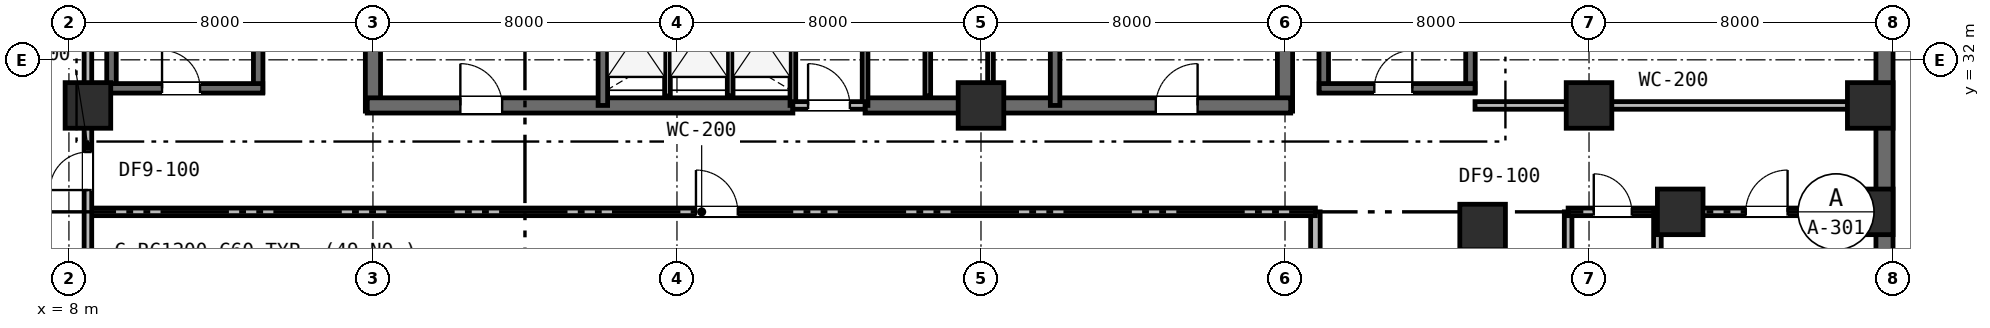
"""IFC4 building model, lengths in metres.
Left out: names, types, materials, properties, quantities, classifications, styles, units other than length and angle.
Written with IfcOpenShell. Run it as: python <this file> out.ifc"""

import sys

from ifc_helpers import new_model, si_unit, direction, frame, frame_2d, origin, origin_2d, place, context, subcontext, project, spatial, rectangle, extrude, element, fill, save


model = new_model("IFC4")
c1 = context("Model", 3, precision=1e-05, world=origin(), true_north=direction((0.0, 1.0)))
c2 = subcontext(c1, "Body", "Model", "MODEL_VIEW")
j1 = project(units=[si_unit("LENGTHUNIT", "METRE"), si_unit("PLANEANGLEUNIT", "RADIAN")], contexts=[c1])
p1 = place(None, origin())
s1 = spatial("IfcSite", under=j1, at=p1, CompositionType="ELEMENT")
p2 = place(p1, origin())
s2 = spatial("IfcBuilding", under=s1, at=p2, CompositionType="ELEMENT")
p3 = place(p2, frame((0.0, 0.0, -5.6)))
s3 = spatial("IfcBuildingStorey", under=s2, at=p3, CompositionType="ELEMENT", Elevation=-5.6)
p4 = place(p3, frame((55.775, 0.0, 0.0), z_axis=(0.0, 0.0, 1.0), x_axis=(0.0, 1.0, 0.0)))
e1 = element("IfcWall", 1, at=p4, inside=s3, PredefinedType="USERDEFINED", context=c2, shape_type="SweptSolid", body=[
    extrude(rectangle(XDim=48.0, YDim=0.45, at=frame_2d((24.0, 0.0))), origin(), (0.0, 0.0, 1.0), 5.6),
])
for number, where, z_axis, x_axis in (
    (2, (16.0, 30.65, 0.0), (0.0, 0.0, 1.0), (0.0, 1.0, 0.0)),
    (3, (40.0, 30.65, 0.0), (0.0, 0.0, 1.0), (0.0, 1.0, 0.0)),
):
    element("IfcWall", number, at=place(p3, frame(where, z_axis=z_axis, x_axis=x_axis)), inside=s3, PredefinedType="SHEAR", context=c2, shape_type="SweptSolid", body=[
        extrude(rectangle(XDim=12.3, YDim=0.4, at=frame_2d((6.15, 0.0))), origin(), (0.0, 0.0, 1.0), 5.6),
    ])
p5 = place(p3, frame((15.85, 30.8, 0.0), z_axis=(0.0, 0.0, 1.0), x_axis=(1.0, 0.0, 0.0)))
e4 = element("IfcWall", 4, at=p5, inside=s3, PredefinedType="SHEAR", context=c2, shape_type="SweptSolid", body=[
    extrude(rectangle(XDim=11.2, YDim=0.4, at=frame_2d((5.6, 0.0))), origin(), (0.0, 0.0, 1.0), 5.6),
])
p6 = place(p5, frame((2.45, 0.0, 0.0)))
e5 = element("IfcOpeningElement", 5, at=p6, cuts=e4, PredefinedType="OPENING", context=c2, shape_type="SweptSolid", body=[
    extrude(rectangle(XDim=1.1, YDim=2.15, at=frame_2d((0.55, 1.075))), frame((0.0, 0.21, 0.0), z_axis=(0.0, -1.0, 0.0), x_axis=(1.0, 0.0, 0.0)), (0.0, 0.0, 1.0), 0.42),
])
p7 = place(p3, frame((28.95, 30.8, 0.0), z_axis=(0.0, 0.0, 1.0), x_axis=(1.0, 0.0, 0.0)))
e6 = element("IfcWall", 6, at=p7, inside=s3, PredefinedType="SHEAR", context=c2, shape_type="SweptSolid", body=[
    extrude(rectangle(XDim=11.2, YDim=0.4, at=frame_2d((5.6, 0.0))), origin(), (0.0, 0.0, 1.0), 5.6),
])
p8 = place(p7, frame((7.65, 0.0, 0.0)))
e7 = element("IfcOpeningElement", 7, at=p8, cuts=e6, PredefinedType="OPENING", context=c2, shape_type="SweptSolid", body=[
    extrude(rectangle(XDim=1.1, YDim=2.15, at=frame_2d((0.55, 1.075))), frame((0.0, 0.21, 0.0), z_axis=(0.0, -1.0, 0.0), x_axis=(1.0, 0.0, 0.0)), (0.0, 0.0, 1.0), 0.42),
])
for number, where, z_axis, x_axis in (
    (8, (22.05, 30.8, 0.0), (0.0, 0.0, 1.0), (0.0, 1.0, 0.0)),
    (9, (33.95, 30.8, 0.0), (0.0, 0.0, 1.0), (0.0, 1.0, 0.0)),
):
    element("IfcWall", number, at=place(p3, frame(where, z_axis=z_axis, x_axis=x_axis)), inside=s3, PredefinedType="SHEAR", context=c2, shape_type="SweptSolid", body=[
        extrude(rectangle(XDim=6.45, YDim=0.25, at=frame_2d((3.225, 0.0))), origin(), (0.0, 0.0, 1.0), 5.6),
    ])
for number, where, z_axis, x_axis in (
    (10, (9.12, 31.15, 0.0), (0.0, 0.0, 1.0), (0.0, 1.0, 0.0)),
    (11, (12.98, 31.15, 0.0), (0.0, 0.0, 1.0), (0.0, 1.0, 0.0)),
):
    element("IfcWall", number, at=place(p3, frame(where, z_axis=z_axis, x_axis=x_axis)), inside=s3, PredefinedType="SHEAR", context=c2, shape_type="SweptSolid", body=[
        extrude(rectangle(XDim=8.8, YDim=0.25, at=frame_2d((4.4, 0.0))), origin(), (0.0, 0.0, 1.0), 5.6),
    ])
p9 = place(p3, frame((9.0, 31.25, 0.0), z_axis=(0.0, 0.0, 1.0), x_axis=(1.0, 0.0, 0.0)))
e12 = element("IfcWall", 12, at=p9, inside=s3, PredefinedType="SHEAR", context=c2, shape_type="SweptSolid", body=[
    extrude(rectangle(XDim=4.1, YDim=0.25, at=frame_2d((2.05, 0.0))), origin(), (0.0, 0.0, 1.0), 5.6),
])
p10 = place(p9, frame((1.45, 0.0, 0.0)))
e13 = element("IfcOpeningElement", 13, at=p10, cuts=e12, PredefinedType="OPENING", context=c2, shape_type="SweptSolid", body=[
    extrude(rectangle(XDim=1.0, YDim=2.15, at=frame_2d((0.5, 1.075))), frame((0.0, 0.135, 0.0), z_axis=(0.0, -1.0, 0.0), x_axis=(1.0, 0.0, 0.0)), (0.0, 0.0, 1.0), 0.27),
])
for number, where, z_axis, x_axis in (
    (14, (41.02, 31.15, 0.0), (0.0, 0.0, 1.0), (0.0, 1.0, 0.0)),
    (15, (44.88, 31.15, 0.0), (0.0, 0.0, 1.0), (0.0, 1.0, 0.0)),
):
    element("IfcWall", number, at=place(p3, frame(where, z_axis=z_axis, x_axis=x_axis)), inside=s3, PredefinedType="SHEAR", context=c2, shape_type="SweptSolid", body=[
        extrude(rectangle(XDim=8.8, YDim=0.25, at=frame_2d((4.4, 0.0))), origin(), (0.0, 0.0, 1.0), 5.6),
    ])
p11 = place(p3, frame((40.9, 31.25, 0.0), z_axis=(0.0, 0.0, 1.0), x_axis=(1.0, 0.0, 0.0)))
e16 = element("IfcWall", 16, at=p11, inside=s3, PredefinedType="SHEAR", context=c2, shape_type="SweptSolid", body=[
    extrude(rectangle(XDim=4.1, YDim=0.25, at=frame_2d((2.05, 0.0))), origin(), (0.0, 0.0, 1.0), 5.6),
])
p12 = place(p11, frame((1.45, 0.0, 0.0)))
e17 = element("IfcOpeningElement", 17, at=p12, cuts=e16, PredefinedType="OPENING", context=c2, shape_type="SweptSolid", body=[
    extrude(rectangle(XDim=1.0, YDim=2.15, at=frame_2d((0.5, 1.075))), frame((0.0, 0.135, 0.0), z_axis=(0.0, -1.0, 0.0), x_axis=(1.0, 0.0, 0.0)), (0.0, 0.0, 1.0), 0.27),
])
for number, where, z_axis, x_axis in (
    (18, (8.5, 30.8, 0.0), (0.0, 0.0, 1.0), (1.0, 0.0, 0.0)),
    (19, (45.2, 27.6, 0.0), (0.0, 0.0, 1.0), (1.0, 0.0, 0.0)),
    (20, (50.4, 28.0, 0.0), (0.0, 0.0, 1.0), (1.0, 0.0, 0.0)),
    (21, (55.4, 28.0, 0.0), (0.0, 0.0, 1.0), (1.0, 0.0, 0.0)),
    (22, (55.4, 30.8, 0.0), (0.0, 0.0, 1.0), (1.0, 0.0, 0.0)),
    (23, (32.0, 30.8, 0.0), (0.0, 0.0, 1.0), (1.0, 0.0, 0.0)),
    (24, (48.0, 30.8, 0.0), (0.0, 0.0, 1.0), (1.0, 0.0, 0.0)),
):
    element("IfcColumn", number, at=place(p3, frame(where, z_axis=z_axis, x_axis=x_axis)), inside=s3, PredefinedType="COLUMN", context=c2, shape_type="SweptSolid", body=[
        extrude(rectangle(XDim=1.2, YDim=1.2, at=origin_2d()), origin(), (0.0, 0.0, 1.0), 5.6),
    ])
p13 = place(p3, frame((40.8, 12.0, 0.0), z_axis=(0.0, 0.0, 1.0), x_axis=(0.0, 1.0, 0.0)))
e25 = element("IfcWall", 25, at=p13, inside=s3, PredefinedType="STANDARD", context=c2, shape_type="SweptSolid", body=[
    extrude(rectangle(XDim=16.0, YDim=0.25, at=frame_2d((8.0, 0.0))), origin(), (0.0, 0.0, 1.0), 5.27),
])
p14 = place(p3, frame((27.05, 30.8, 0.0), z_axis=(0.0, 0.0, 1.0), x_axis=(0.0, 1.0, 0.0)))
e26 = element("IfcWall", 26, at=p14, inside=s3, PredefinedType="PLUMBINGWALL", context=c2, shape_type="SweptSolid", body=[
    extrude(rectangle(XDim=3.45, YDim=0.15, at=frame_2d((1.725, 0.0))), origin(), (0.0, 0.0, 1.0), 5.01),
])
p15 = place(p3, frame((28.95, 30.8, 0.0), z_axis=(0.0, 0.0, 1.0), x_axis=(0.0, 1.0, 0.0)))
e27 = element("IfcWall", 27, at=p15, inside=s3, PredefinedType="PLUMBINGWALL", context=c2, shape_type="SweptSolid", body=[
    extrude(rectangle(XDim=3.45, YDim=0.15, at=frame_2d((1.725, 0.0))), origin(), (0.0, 0.0, 1.0), 4.76),
])
p16 = place(p3, frame((27.05, 30.8, 0.0), z_axis=(0.0, 0.0, 1.0), x_axis=(1.0, 0.0, 0.0)))
e28 = element("IfcWall", 28, at=p16, inside=s3, PredefinedType="PARTITIONING", context=c2, shape_type="SweptSolid", body=[
    extrude(rectangle(XDim=1.9, YDim=0.2, at=frame_2d((0.95, 0.0))), origin(), (0.0, 0.0, 1.0), 4.76),
])
p17 = place(p16, frame((0.4, 0.0, 0.0)))
e29 = element("IfcOpeningElement", 29, at=p17, cuts=e28, PredefinedType="OPENING", context=c2, shape_type="SweptSolid", body=[
    extrude(rectangle(XDim=1.1, YDim=2.15, at=frame_2d((0.55, 1.075))), frame((0.0, 0.11, 0.0), z_axis=(0.0, -1.0, 0.0), x_axis=(1.0, 0.0, 0.0)), (0.0, 0.0, 1.0), 0.22),
])
for number, where, z_axis, x_axis in (
    (30, (23.75, 31.05, 0.0), (0.0, 0.0, 1.0), (0.0, 1.0, 0.0)),
    (31, (25.4, 31.05, 0.0), (0.0, 0.0, 1.0), (0.0, 1.0, 0.0)),
    (32, (30.6, 31.05, 0.0), (0.0, 0.0, 1.0), (0.0, 1.0, 0.0)),
):
    element("IfcWall", number, at=place(p3, frame(where, z_axis=z_axis, x_axis=x_axis)), inside=s3, PredefinedType="PLUMBINGWALL", context=c2, shape_type="SweptSolid", body=[
        extrude(rectangle(XDim=3.1, YDim=0.15, at=frame_2d((1.55, 0.0))), origin(), (0.0, 0.0, 1.0), 5.27),
    ])
p18 = place(p3, frame((32.25, 31.05, 0.0), z_axis=(0.0, 0.0, 1.0), x_axis=(0.0, 1.0, 0.0)))
e33 = element("IfcWall", 33, at=p18, inside=s3, PredefinedType="PLUMBINGWALL", context=c2, shape_type="SweptSolid", body=[
    extrude(rectangle(XDim=3.1, YDim=0.15, at=frame_2d((1.55, 0.0))), origin(), (0.0, 0.0, 1.0), 4.66),
])
p19 = place(p3, frame((45.0, 30.8, 0.0), z_axis=(0.0, 0.0, 1.0), x_axis=(1.0, 0.0, 0.0)))
e34 = element("IfcWall", 34, at=p19, inside=s3, PredefinedType="PARTITIONING", context=c2, shape_type="SweptSolid", body=[
    extrude(rectangle(XDim=10.45, YDim=0.2, at=frame_2d((5.225, 0.0))), origin(), (0.0, 0.0, 1.0), 4.66),
])
p20 = place(p3, frame((8.5, 28.0, 0.0), z_axis=(0.0, 0.0, 1.0), x_axis=(1.0, 0.0, 0.0)))
e35 = element("IfcWall", 35, at=p20, inside=s3, PredefinedType="PARTITIONING", context=c2, shape_type="SweptSolid", body=[
    extrude(rectangle(XDim=32.3, YDim=0.2, at=frame_2d((16.15, 0.0))), origin(), (0.0, 0.0, 1.0), 4.66),
])
p21 = place(p20, frame((16.0, 0.0, 0.0)))
e36 = element("IfcOpeningElement", 36, at=p21, cuts=e35, PredefinedType="OPENING", context=c2, shape_type="SweptSolid", body=[
    extrude(rectangle(XDim=1.1, YDim=2.15, at=frame_2d((0.55, 1.075))), frame((0.0, 0.11, 0.0), z_axis=(0.0, -1.0, 0.0), x_axis=(1.0, 0.0, 0.0)), (0.0, 0.0, 1.0), 0.22),
])
p22 = place(p3, frame((8.5, 12.0, 0.0), z_axis=(0.0, 0.0, 1.0), x_axis=(0.0, 1.0, 0.0)))
e37 = element("IfcWall", 37, at=p22, inside=s3, PredefinedType="PARTITIONING", context=c2, shape_type="SweptSolid", body=[
    extrude(rectangle(XDim=35.45, YDim=0.2, at=frame_2d((17.725, 0.0))), origin(), (0.0, 0.0, 1.0), 4.66),
])
p23 = place(p22, frame((16.574, 0.0, 0.0)))
e38 = element("IfcOpeningElement", 38, at=p23, cuts=e37, PredefinedType="OPENING", context=c2, shape_type="SweptSolid", body=[
    extrude(rectangle(XDim=1.0, YDim=2.15, at=frame_2d((0.5, 1.075))), frame((0.0, 0.11, 0.0), z_axis=(0.0, -1.0, 0.0), x_axis=(1.0, 0.0, 0.0)), (0.0, 0.0, 1.0), 0.22),
])
p24 = place(p3, frame((47.45, 23.85, 0.0), z_axis=(0.0, 0.0, 1.0), x_axis=(0.0, 1.0, 0.0)))
e39 = element("IfcWall", 39, at=p24, inside=s3, PredefinedType="PARTITIONING", context=c2, shape_type="SweptSolid", body=[
    extrude(rectangle(XDim=4.15, YDim=0.2, at=frame_2d((2.075, 0.0))), origin(), (0.0, 0.0, 1.0), 5.27),
])
p25 = place(p3, frame((47.45, 28.0, 0.0), z_axis=(0.0, 0.0, 1.0), x_axis=(1.0, 0.0, 0.0)))
e40 = element("IfcWall", 40, at=p25, inside=s3, PredefinedType="PARTITIONING", context=c2, shape_type="SweptSolid", body=[
    extrude(rectangle(XDim=8.0, YDim=0.2, at=frame_2d((4.0, 0.0))), origin(), (0.0, 0.0, 1.0), 4.66),
])
p26 = place(p25, frame((0.675, 0.0, 0.0)))
e41 = element("IfcOpeningElement", 41, at=p26, cuts=e40, PredefinedType="OPENING", context=c2, shape_type="SweptSolid", body=[
    extrude(rectangle(XDim=1.0, YDim=2.15, at=frame_2d((0.5, 1.075))), frame((0.0, 0.11, 0.0), z_axis=(0.0, -1.0, 0.0), x_axis=(1.0, 0.0, 0.0)), (0.0, 0.0, 1.0), 0.22),
])
p27 = place(p25, frame((4.675, 0.0, 0.0)))
e42 = element("IfcOpeningElement", 42, at=p27, cuts=e40, PredefinedType="OPENING", context=c2, shape_type="SweptSolid", body=[
    extrude(rectangle(XDim=1.1, YDim=2.15, at=frame_2d((0.55, 1.075))), frame((0.0, 0.11, 0.0), z_axis=(0.0, -1.0, 0.0), x_axis=(1.0, 0.0, 0.0)), (0.0, 0.0, 1.0), 0.22),
])
p28 = place(p3, frame((49.8, 22.0, 0.0), z_axis=(0.0, 0.0, 1.0), x_axis=(0.0, 1.0, 0.0)))
e43 = element("IfcWall", 43, at=p28, inside=s3, PredefinedType="PARTITIONING", context=c2, shape_type="SweptSolid", body=[
    extrude(rectangle(XDim=6.0, YDim=0.2, at=frame_2d((3.0, 0.0))), origin(), (0.0, 0.0, 1.0), 5.27),
])
p29 = place(p17, origin())
e44 = element("IfcDoor", 44, at=p29, inside=s3, OperationType="SINGLE_SWING_LEFT", PredefinedType="DOOR", context=c2, shape_type="SweptSolid", body=[
    extrude(rectangle(XDim=1.1, YDim=2.15, at=frame_2d((0.55, 1.075))), frame((0.0, 0.025, 0.0), z_axis=(0.0, -1.0, 0.0), x_axis=(1.0, 0.0, 0.0)), (0.0, 0.0, 1.0), 0.05),
])
fill(e29, e44)
p30 = place(p6, origin())
e45 = element("IfcDoor", 45, at=p30, inside=s3, OperationType="SINGLE_SWING_LEFT", PredefinedType="DOOR", context=c2, shape_type="SweptSolid", body=[
    extrude(rectangle(XDim=1.1, YDim=2.15, at=frame_2d((0.55, 1.075))), frame((0.0, 0.025, 0.0), z_axis=(0.0, -1.0, 0.0), x_axis=(1.0, 0.0, 0.0)), (0.0, 0.0, 1.0), 0.05),
])
fill(e5, e45)
p31 = place(p8, origin())
e46 = element("IfcDoor", 46, at=p31, inside=s3, OperationType="SINGLE_SWING_RIGHT", PredefinedType="DOOR", context=c2, shape_type="SweptSolid", body=[
    extrude(rectangle(XDim=1.1, YDim=2.15, at=frame_2d((0.55, 1.075))), frame((0.0, 0.025, 0.0), z_axis=(0.0, -1.0, 0.0), x_axis=(1.0, 0.0, 0.0)), (0.0, 0.0, 1.0), 0.05),
])
fill(e7, e46)
p32 = place(p10, origin())
e47 = element("IfcDoor", 47, at=p32, inside=s3, OperationType="SINGLE_SWING_LEFT", PredefinedType="DOOR", context=c2, shape_type="SweptSolid", body=[
    extrude(rectangle(XDim=1.0, YDim=2.15, at=frame_2d((0.5, 1.075))), frame((0.0, 0.025, 0.0), z_axis=(0.0, -1.0, 0.0), x_axis=(1.0, 0.0, 0.0)), (0.0, 0.0, 1.0), 0.05),
])
fill(e13, e47)
p33 = place(p12, origin())
e48 = element("IfcDoor", 48, at=p33, inside=s3, OperationType="SINGLE_SWING_RIGHT", PredefinedType="DOOR", context=c2, shape_type="SweptSolid", body=[
    extrude(rectangle(XDim=1.0, YDim=2.15, at=frame_2d((0.5, 1.075))), frame((0.0, 0.025, 0.0), z_axis=(0.0, -1.0, 0.0), x_axis=(1.0, 0.0, 0.0)), (0.0, 0.0, 1.0), 0.05),
])
fill(e17, e48)
p34 = place(p21, origin())
e49 = element("IfcDoor", 49, at=p34, inside=s3, OperationType="SINGLE_SWING_LEFT", PredefinedType="DOOR", context=c2, shape_type="SweptSolid", body=[
    extrude(rectangle(XDim=1.1, YDim=2.15, at=frame_2d((0.55, 1.075))), frame((0.0, 0.025, 0.0), z_axis=(0.0, -1.0, 0.0), x_axis=(1.0, 0.0, 0.0)), (0.0, 0.0, 1.0), 0.05),
])
fill(e36, e49)
p35 = place(p23, origin())
e50 = element("IfcDoor", 50, at=p35, inside=s3, OperationType="SINGLE_SWING_LEFT", PredefinedType="DOOR", context=c2, shape_type="SweptSolid", body=[
    extrude(rectangle(XDim=1.0, YDim=2.15, at=frame_2d((0.5, 1.075))), frame((0.0, 0.025, 0.0), z_axis=(0.0, -1.0, 0.0), x_axis=(1.0, 0.0, 0.0)), (0.0, 0.0, 1.0), 0.05),
])
fill(e38, e50)
p36 = place(p26, origin())
e51 = element("IfcDoor", 51, at=p36, inside=s3, OperationType="SINGLE_SWING_LEFT", PredefinedType="DOOR", context=c2, shape_type="SweptSolid", body=[
    extrude(rectangle(XDim=1.0, YDim=2.15, at=frame_2d((0.5, 1.075))), frame((0.0, 0.025, 0.0), z_axis=(0.0, -1.0, 0.0), x_axis=(1.0, 0.0, 0.0)), (0.0, 0.0, 1.0), 0.05),
])
fill(e41, e51)
p37 = place(p27, origin())
e52 = element("IfcDoor", 52, at=p37, inside=s3, OperationType="SINGLE_SWING_RIGHT", PredefinedType="DOOR", context=c2, shape_type="SweptSolid", body=[
    extrude(rectangle(XDim=1.1, YDim=2.15, at=frame_2d((0.55, 1.075))), frame((0.0, 0.025, 0.0), z_axis=(0.0, -1.0, 0.0), x_axis=(1.0, 0.0, 0.0)), (0.0, 0.0, 1.0), 0.05),
])
fill(e42, e52)
save(model, sys.argv[1])
